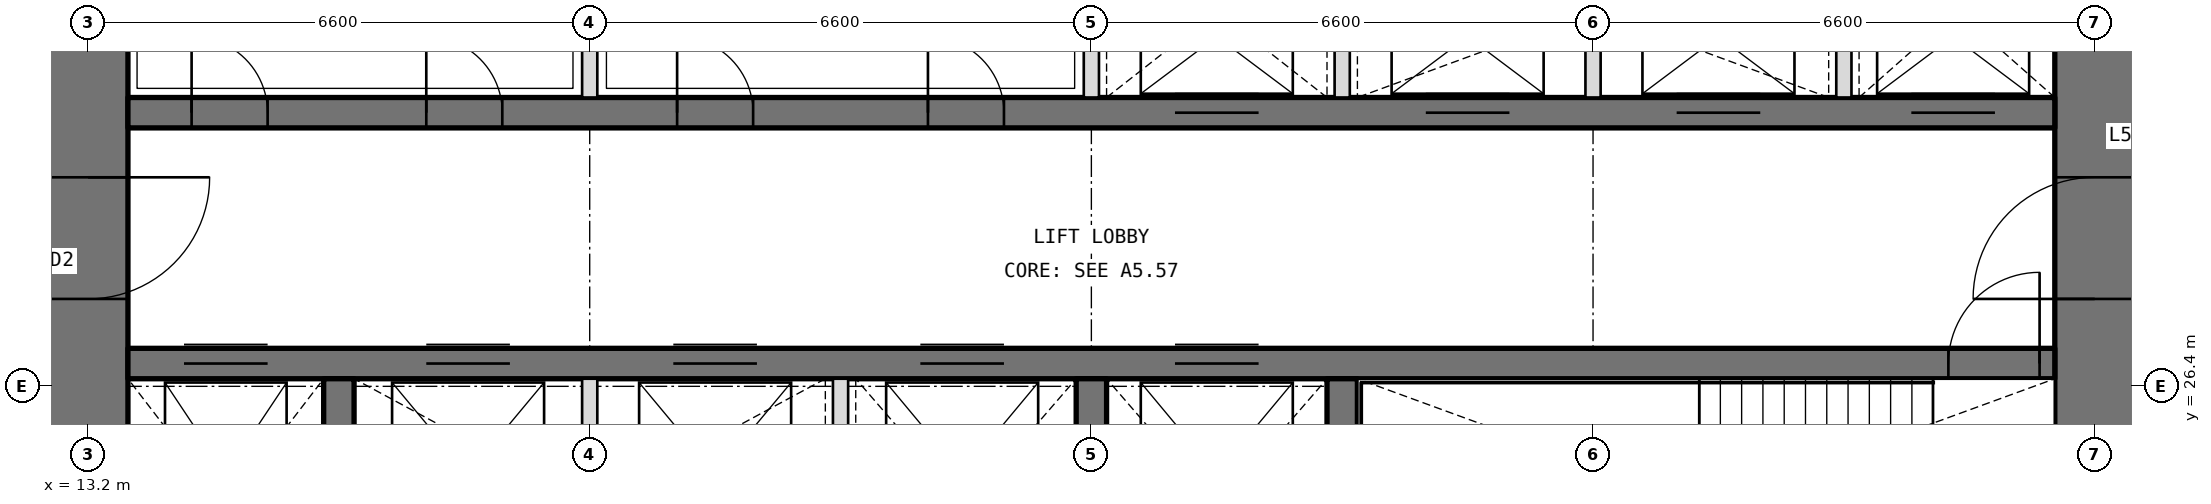
"""IFC4 building model, lengths in metres.
Left out: names, types, materials, properties, quantities, classifications, styles, units other than length and angle.
Written with IfcOpenShell. Run it as: python <this file> out.ifc"""

import sys

from ifc_helpers import new_model, si_unit, direction, frame, frame_2d, origin, place, context, subcontext, project, spatial, rectangle, extrude, element, fill, save


model = new_model("IFC4")
c1 = context("Model", 3, precision=1e-05, world=origin(), true_north=direction((0.0, 1.0)))
c2 = subcontext(c1, "Body", "Model", "MODEL_VIEW")
j1 = project(units=[si_unit("LENGTHUNIT", "METRE"), si_unit("PLANEANGLEUNIT", "RADIAN")], contexts=[c1])
p1 = place(None, origin())
s1 = spatial("IfcSite", under=j1, at=p1, CompositionType="ELEMENT")
p2 = place(p1, origin())
s2 = spatial("IfcBuilding", under=s1, at=p2, CompositionType="ELEMENT")
p3 = place(p2, frame((0.0, 0.0, 241.8)))
s3 = spatial("IfcBuildingStorey", under=s2, at=p3, CompositionType="ELEMENT", Elevation=241.8)
p4 = place(p3, frame((39.6, 13.725, 0.0), z_axis=(0.0, 0.0, 1.0), x_axis=(0.0, 1.0, 0.0)))
e1 = element("IfcWall", 1, at=p4, inside=s3, PredefinedType="SHEAR", context=c2, shape_type="SweptSolid", body=[
    extrude(rectangle(XDim=18.75, YDim=1.05, at=frame_2d((9.375, 0.0))), origin(), (0.0, 0.0, 1.0), 4.2),
])
p5 = place(p4, frame((3.025, 0.0, 0.0)))
e2 = element("IfcOpeningElement", 2, at=p5, cuts=e1, PredefinedType="OPENING", context=c2, shape_type="SweptSolid", body=[
    extrude(rectangle(XDim=1.6, YDim=2.1, at=frame_2d((0.8, 1.05))), frame((0.0, 0.535, 0.0), z_axis=(0.0, -1.0, 0.0), x_axis=(1.0, 0.0, 0.0)), (0.0, 0.0, 1.0), 1.07),
])
p6 = place(p4, frame((13.825, 0.0, 0.0)))
e3 = element("IfcOpeningElement", 3, at=p6, cuts=e1, PredefinedType="OPENING", context=c2, shape_type="SweptSolid", body=[
    extrude(rectangle(XDim=1.6, YDim=2.1, at=frame_2d((0.8, 1.05))), frame((0.0, 0.535, 0.0), z_axis=(0.0, -1.0, 0.0), x_axis=(1.0, 0.0, 0.0)), (0.0, 0.0, 1.0), 1.07),
])
p7 = place(p3, frame((13.2, 32.475, 0.0), z_axis=(0.0, 0.0, 1.0), x_axis=(0.0, -1.0, 0.0)))
e4 = element("IfcWall", 4, at=p7, inside=s3, PredefinedType="SHEAR", context=c2, shape_type="SweptSolid", body=[
    extrude(rectangle(XDim=18.75, YDim=1.05, at=frame_2d((9.375, 0.0))), origin(), (0.0, 0.0, 1.0), 4.2),
])
p8 = place(p7, frame((14.125, 0.0, 0.0)))
e5 = element("IfcOpeningElement", 5, at=p8, cuts=e4, PredefinedType="OPENING", context=c2, shape_type="SweptSolid", body=[
    extrude(rectangle(XDim=1.6, YDim=2.1, at=frame_2d((0.8, 1.05))), frame((0.0, 0.535, 0.0), z_axis=(0.0, -1.0, 0.0), x_axis=(1.0, 0.0, 0.0)), (0.0, 0.0, 1.0), 1.07),
])
p9 = place(p7, frame((3.325, 0.0, 0.0)))
e6 = element("IfcOpeningElement", 6, at=p9, cuts=e4, PredefinedType="OPENING", context=c2, shape_type="SweptSolid", body=[
    extrude(rectangle(XDim=1.6, YDim=2.1, at=frame_2d((0.8, 1.05))), frame((0.0, 0.535, 0.0), z_axis=(0.0, -1.0, 0.0), x_axis=(1.0, 0.0, 0.0)), (0.0, 0.0, 1.0), 1.07),
])
p10 = place(p3, frame((13.725, 26.7, 0.0), z_axis=(0.0, 0.0, 1.0), x_axis=(1.0, 0.0, 0.0)))
e7 = element("IfcWall", 7, at=p10, inside=s3, PredefinedType="SHEAR", context=c2, shape_type="SweptSolid", body=[
    extrude(rectangle(XDim=25.35, YDim=0.4, at=frame_2d((12.675, 0.0))), origin(), (0.0, 0.0, 1.0), 4.2),
])
p11 = place(p10, frame((23.95, 0.0, 0.0)))
e8 = element("IfcOpeningElement", 8, at=p11, cuts=e7, PredefinedType="OPENING", context=c2, shape_type="SweptSolid", body=[
    extrude(rectangle(XDim=1.2, YDim=2.1, at=frame_2d((0.6, 1.05))), frame((0.0, 0.21, 0.0), z_axis=(0.0, -1.0, 0.0), x_axis=(1.0, 0.0, 0.0)), (0.0, 0.0, 1.0), 0.42),
])
p12 = place(p10, frame((0.738, 0.0, 0.0)))
e9 = element("IfcOpeningElement", 9, at=p12, cuts=e7, PredefinedType="OPENING", context=c2, shape_type="SweptSolid", body=[
    extrude(rectangle(XDim=1.1, YDim=2.1, at=frame_2d((0.55, 1.05))), frame((0.0, 0.21, 0.0), z_axis=(0.0, -1.0, 0.0), x_axis=(1.0, 0.0, 0.0)), (0.0, 0.0, 1.0), 0.42),
])
p13 = place(p10, frame((3.925, 0.0, 0.0)))
e10 = element("IfcOpeningElement", 10, at=p13, cuts=e7, PredefinedType="OPENING", context=c2, shape_type="SweptSolid", body=[
    extrude(rectangle(XDim=1.1, YDim=2.1, at=frame_2d((0.55, 1.05))), frame((0.0, 0.21, 0.0), z_axis=(0.0, -1.0, 0.0), x_axis=(1.0, 0.0, 0.0)), (0.0, 0.0, 1.0), 0.42),
])
p14 = place(p10, frame((7.175, 0.0, 0.0)))
e11 = element("IfcOpeningElement", 11, at=p14, cuts=e7, PredefinedType="OPENING", context=c2, shape_type="SweptSolid", body=[
    extrude(rectangle(XDim=1.1, YDim=2.1, at=frame_2d((0.55, 1.05))), frame((0.0, 0.21, 0.0), z_axis=(0.0, -1.0, 0.0), x_axis=(1.0, 0.0, 0.0)), (0.0, 0.0, 1.0), 0.42),
])
p15 = place(p10, frame((10.425, 0.0, 0.0)))
e12 = element("IfcOpeningElement", 12, at=p15, cuts=e7, PredefinedType="OPENING", context=c2, shape_type="SweptSolid", body=[
    extrude(rectangle(XDim=1.1, YDim=2.1, at=frame_2d((0.55, 1.05))), frame((0.0, 0.21, 0.0), z_axis=(0.0, -1.0, 0.0), x_axis=(1.0, 0.0, 0.0)), (0.0, 0.0, 1.0), 0.42),
])
p16 = place(p10, frame((13.775, 0.0, 0.0)))
e13 = element("IfcOpeningElement", 13, at=p16, cuts=e7, PredefinedType="OPENING", context=c2, shape_type="SweptSolid", body=[
    extrude(rectangle(XDim=1.1, YDim=2.1, at=frame_2d((0.55, 1.05))), frame((0.0, 0.21, 0.0), z_axis=(0.0, -1.0, 0.0), x_axis=(1.0, 0.0, 0.0)), (0.0, 0.0, 1.0), 0.42),
])
p17 = place(p3, frame((13.725, 30.0, 0.0), z_axis=(0.0, 0.0, 1.0), x_axis=(1.0, 0.0, 0.0)))
e14 = element("IfcWall", 14, at=p17, inside=s3, PredefinedType="SHEAR", context=c2, shape_type="SweptSolid", body=[
    extrude(rectangle(XDim=25.35, YDim=0.4, at=frame_2d((12.675, 0.0))), origin(), (0.0, 0.0, 1.0), 4.2),
])
p18 = place(p17, frame((0.837, 0.0, 0.0)))
e15 = element("IfcOpeningElement", 15, at=p18, cuts=e14, PredefinedType="OPENING", context=c2, shape_type="SweptSolid", body=[
    extrude(rectangle(XDim=1.0, YDim=2.1, at=frame_2d((0.5, 1.05))), frame((0.0, 0.21, 0.0), z_axis=(0.0, -1.0, 0.0), x_axis=(1.0, 0.0, 0.0)), (0.0, 0.0, 1.0), 0.42),
])
p19 = place(p17, frame((3.925, 0.0, 0.0)))
e16 = element("IfcOpeningElement", 16, at=p19, cuts=e14, PredefinedType="OPENING", context=c2, shape_type="SweptSolid", body=[
    extrude(rectangle(XDim=1.0, YDim=2.1, at=frame_2d((0.5, 1.05))), frame((0.0, 0.21, 0.0), z_axis=(0.0, -1.0, 0.0), x_axis=(1.0, 0.0, 0.0)), (0.0, 0.0, 1.0), 0.42),
])
p20 = place(p17, frame((7.225, 0.0, 0.0)))
e17 = element("IfcOpeningElement", 17, at=p20, cuts=e14, PredefinedType="OPENING", context=c2, shape_type="SweptSolid", body=[
    extrude(rectangle(XDim=1.0, YDim=2.1, at=frame_2d((0.5, 1.05))), frame((0.0, 0.21, 0.0), z_axis=(0.0, -1.0, 0.0), x_axis=(1.0, 0.0, 0.0)), (0.0, 0.0, 1.0), 0.42),
])
p21 = place(p17, frame((10.525, 0.0, 0.0)))
e18 = element("IfcOpeningElement", 18, at=p21, cuts=e14, PredefinedType="OPENING", context=c2, shape_type="SweptSolid", body=[
    extrude(rectangle(XDim=1.0, YDim=2.1, at=frame_2d((0.5, 1.05))), frame((0.0, 0.21, 0.0), z_axis=(0.0, -1.0, 0.0), x_axis=(1.0, 0.0, 0.0)), (0.0, 0.0, 1.0), 0.42),
])
p22 = place(p17, frame((13.775, 0.0, 0.0)))
e19 = element("IfcOpeningElement", 19, at=p22, cuts=e14, PredefinedType="OPENING", context=c2, shape_type="SweptSolid", body=[
    extrude(rectangle(XDim=1.1, YDim=2.1, at=frame_2d((0.55, 1.05))), frame((0.0, 0.21, 0.0), z_axis=(0.0, -1.0, 0.0), x_axis=(1.0, 0.0, 0.0)), (0.0, 0.0, 1.0), 0.42),
])
p23 = place(p17, frame((17.075, 0.0, 0.0)))
e20 = element("IfcOpeningElement", 20, at=p23, cuts=e14, PredefinedType="OPENING", context=c2, shape_type="SweptSolid", body=[
    extrude(rectangle(XDim=1.1, YDim=2.1, at=frame_2d((0.55, 1.05))), frame((0.0, 0.21, 0.0), z_axis=(0.0, -1.0, 0.0), x_axis=(1.0, 0.0, 0.0)), (0.0, 0.0, 1.0), 0.42),
])
p24 = place(p17, frame((20.375, 0.0, 0.0)))
e21 = element("IfcOpeningElement", 21, at=p24, cuts=e14, PredefinedType="OPENING", context=c2, shape_type="SweptSolid", body=[
    extrude(rectangle(XDim=1.1, YDim=2.1, at=frame_2d((0.55, 1.05))), frame((0.0, 0.21, 0.0), z_axis=(0.0, -1.0, 0.0), x_axis=(1.0, 0.0, 0.0)), (0.0, 0.0, 1.0), 0.42),
])
p25 = place(p17, frame((23.462, 0.0, 0.0)))
e22 = element("IfcOpeningElement", 22, at=p25, cuts=e14, PredefinedType="OPENING", context=c2, shape_type="SweptSolid", body=[
    extrude(rectangle(XDim=1.1, YDim=2.1, at=frame_2d((0.55, 1.05))), frame((0.0, 0.21, 0.0), z_axis=(0.0, -1.0, 0.0), x_axis=(1.0, 0.0, 0.0)), (0.0, 0.0, 1.0), 0.42),
])
for number, where, z_axis, x_axis in (
    (23, (16.5, 23.15, 0.0), (0.0, 0.0, 1.0), (0.0, 1.0, 0.0)),
    (24, (26.4, 23.15, 0.0), (0.0, 0.0, 1.0), (0.0, 1.0, 0.0)),
    (25, (29.7, 23.15, 0.0), (0.0, 0.0, 1.0), (0.0, 1.0, 0.0)),
):
    element("IfcWall", number, at=place(p3, frame(where, z_axis=z_axis, x_axis=x_axis)), inside=s3, PredefinedType="SHEAR", context=c2, shape_type="SweptSolid", body=[
        extrude(rectangle(XDim=3.35, YDim=0.4, at=frame_2d((1.675, 0.0))), origin(), (0.0, 0.0, 1.0), 4.2),
    ])
for number, where, z_axis, x_axis in (
    (26, (19.8, 30.2, 0.0), (0.0, 0.0, 1.0), (0.0, 1.0, 0.0)),
    (27, (26.4, 30.2, 0.0), (0.0, 0.0, 1.0), (0.0, 1.0, 0.0)),
    (28, (29.7, 30.2, 0.0), (0.0, 0.0, 1.0), (0.0, 1.0, 0.0)),
    (29, (33.0, 30.2, 0.0), (0.0, 0.0, 1.0), (0.0, 1.0, 0.0)),
    (30, (36.3, 30.2, 0.0), (0.0, 0.0, 1.0), (0.0, 1.0, 0.0)),
):
    element("IfcWall", number, at=place(p3, frame(where, z_axis=z_axis, x_axis=x_axis)), inside=s3, PredefinedType="PARTITIONING", context=c2, shape_type="SweptSolid", body=[
        extrude(rectangle(XDim=2.275, YDim=0.2, at=frame_2d((1.138, 0.0))), origin(), (0.0, 0.0, 1.0), 4.2),
    ])
for number, where, z_axis, x_axis in (
    (31, (19.8, 23.15, 0.0), (0.0, 0.0, 1.0), (0.0, 1.0, 0.0)),
    (32, (23.1, 23.15, 0.0), (0.0, 0.0, 1.0), (0.0, 1.0, 0.0)),
):
    element("IfcWall", number, at=place(p3, frame(where, z_axis=z_axis, x_axis=x_axis)), inside=s3, PredefinedType="PARTITIONING", context=c2, shape_type="SweptSolid", body=[
        extrude(rectangle(XDim=3.35, YDim=0.2, at=frame_2d((1.675, 0.0))), origin(), (0.0, 0.0, 1.0), 4.2),
    ])
p26 = place(p18, origin())
e33 = element("IfcDoor", 33, at=p26, inside=s3, OperationType="SINGLE_SWING_LEFT", PredefinedType="DOOR", context=c2, shape_type="SweptSolid", body=[
    extrude(rectangle(XDim=1.0, YDim=2.1, at=frame_2d((0.5, 1.05))), frame((0.0, 0.025, 0.0), z_axis=(0.0, -1.0, 0.0), x_axis=(1.0, 0.0, 0.0)), (0.0, 0.0, 1.0), 0.05),
])
fill(e15, e33)
p27 = place(p19, origin())
e34 = element("IfcDoor", 34, at=p27, inside=s3, OperationType="SINGLE_SWING_LEFT", PredefinedType="DOOR", context=c2, shape_type="SweptSolid", body=[
    extrude(rectangle(XDim=1.0, YDim=2.1, at=frame_2d((0.5, 1.05))), frame((0.0, 0.025, 0.0), z_axis=(0.0, -1.0, 0.0), x_axis=(1.0, 0.0, 0.0)), (0.0, 0.0, 1.0), 0.05),
])
fill(e16, e34)
p28 = place(p20, origin())
e35 = element("IfcDoor", 35, at=p28, inside=s3, OperationType="SINGLE_SWING_LEFT", PredefinedType="DOOR", context=c2, shape_type="SweptSolid", body=[
    extrude(rectangle(XDim=1.0, YDim=2.1, at=frame_2d((0.5, 1.05))), frame((0.0, 0.025, 0.0), z_axis=(0.0, -1.0, 0.0), x_axis=(1.0, 0.0, 0.0)), (0.0, 0.0, 1.0), 0.05),
])
fill(e17, e35)
p29 = place(p21, origin())
e36 = element("IfcDoor", 36, at=p29, inside=s3, OperationType="SINGLE_SWING_LEFT", PredefinedType="DOOR", context=c2, shape_type="SweptSolid", body=[
    extrude(rectangle(XDim=1.0, YDim=2.1, at=frame_2d((0.5, 1.05))), frame((0.0, 0.025, 0.0), z_axis=(0.0, -1.0, 0.0), x_axis=(1.0, 0.0, 0.0)), (0.0, 0.0, 1.0), 0.05),
])
fill(e18, e36)
p30 = place(p11, origin())
e37 = element("IfcDoor", 37, at=p30, inside=s3, OperationType="SINGLE_SWING_RIGHT", PredefinedType="DOOR", context=c2, shape_type="SweptSolid", body=[
    extrude(rectangle(XDim=1.2, YDim=2.1, at=frame_2d((0.6, 1.05))), frame((0.0, 0.025, 0.0), z_axis=(0.0, -1.0, 0.0), x_axis=(1.0, 0.0, 0.0)), (0.0, 0.0, 1.0), 0.05),
])
fill(e8, e37)
p31 = place(p9, origin())
e38 = element("IfcDoor", 38, at=p31, inside=s3, OperationType="DOUBLE_DOOR_DOUBLE_SWING", PredefinedType="DOOR", context=c2, shape_type="SweptSolid", body=[
    extrude(rectangle(XDim=1.6, YDim=2.1, at=frame_2d((0.8, 1.05))), frame((0.0, 0.025, 0.0), z_axis=(0.0, -1.0, 0.0), x_axis=(1.0, 0.0, 0.0)), (0.0, 0.0, 1.0), 0.05),
])
fill(e6, e38)
p32 = place(p6, origin())
e39 = element("IfcDoor", 39, at=p32, inside=s3, OperationType="DOUBLE_DOOR_DOUBLE_SWING", PredefinedType="DOOR", context=c2, shape_type="SweptSolid", body=[
    extrude(rectangle(XDim=1.6, YDim=2.1, at=frame_2d((0.8, 1.05))), frame((0.0, 0.025, 0.0), z_axis=(0.0, -1.0, 0.0), x_axis=(1.0, 0.0, 0.0)), (0.0, 0.0, 1.0), 0.05),
])
fill(e3, e39)
p33 = place(p22, origin())
e40 = element("IfcDoor", 40, at=p33, inside=s3, OperationType="DOUBLE_DOOR_SLIDING", PredefinedType="DOOR", context=c2, shape_type="SweptSolid", body=[
    extrude(rectangle(XDim=1.1, YDim=2.1, at=frame_2d((0.55, 1.05))), frame((0.0, 0.025, 0.0), z_axis=(0.0, -1.0, 0.0), x_axis=(1.0, 0.0, 0.0)), (0.0, 0.0, 1.0), 0.05),
])
fill(e19, e40)
p34 = place(p23, origin())
e41 = element("IfcDoor", 41, at=p34, inside=s3, OperationType="DOUBLE_DOOR_SLIDING", PredefinedType="DOOR", context=c2, shape_type="SweptSolid", body=[
    extrude(rectangle(XDim=1.1, YDim=2.1, at=frame_2d((0.55, 1.05))), frame((0.0, 0.025, 0.0), z_axis=(0.0, -1.0, 0.0), x_axis=(1.0, 0.0, 0.0)), (0.0, 0.0, 1.0), 0.05),
])
fill(e20, e41)
p35 = place(p24, origin())
e42 = element("IfcDoor", 42, at=p35, inside=s3, OperationType="DOUBLE_DOOR_SLIDING", PredefinedType="DOOR", context=c2, shape_type="SweptSolid", body=[
    extrude(rectangle(XDim=1.1, YDim=2.1, at=frame_2d((0.55, 1.05))), frame((0.0, 0.025, 0.0), z_axis=(0.0, -1.0, 0.0), x_axis=(1.0, 0.0, 0.0)), (0.0, 0.0, 1.0), 0.05),
])
fill(e21, e42)
p36 = place(p25, origin())
e43 = element("IfcDoor", 43, at=p36, inside=s3, OperationType="DOUBLE_DOOR_SLIDING", PredefinedType="DOOR", context=c2, shape_type="SweptSolid", body=[
    extrude(rectangle(XDim=1.1, YDim=2.1, at=frame_2d((0.55, 1.05))), frame((0.0, 0.025, 0.0), z_axis=(0.0, -1.0, 0.0), x_axis=(1.0, 0.0, 0.0)), (0.0, 0.0, 1.0), 0.05),
])
fill(e22, e43)
p37 = place(p12, origin())
e44 = element("IfcDoor", 44, at=p37, inside=s3, OperationType="DOUBLE_DOOR_SLIDING", PredefinedType="DOOR", context=c2, shape_type="SweptSolid", body=[
    extrude(rectangle(XDim=1.1, YDim=2.1, at=frame_2d((0.55, 1.05))), frame((0.0, 0.025, 0.0), z_axis=(0.0, -1.0, 0.0), x_axis=(1.0, 0.0, 0.0)), (0.0, 0.0, 1.0), 0.05),
])
fill(e9, e44)
p38 = place(p13, origin())
e45 = element("IfcDoor", 45, at=p38, inside=s3, OperationType="DOUBLE_DOOR_SLIDING", PredefinedType="DOOR", context=c2, shape_type="SweptSolid", body=[
    extrude(rectangle(XDim=1.1, YDim=2.1, at=frame_2d((0.55, 1.05))), frame((0.0, 0.025, 0.0), z_axis=(0.0, -1.0, 0.0), x_axis=(1.0, 0.0, 0.0)), (0.0, 0.0, 1.0), 0.05),
])
fill(e10, e45)
p39 = place(p14, origin())
e46 = element("IfcDoor", 46, at=p39, inside=s3, OperationType="DOUBLE_DOOR_SLIDING", PredefinedType="DOOR", context=c2, shape_type="SweptSolid", body=[
    extrude(rectangle(XDim=1.1, YDim=2.1, at=frame_2d((0.55, 1.05))), frame((0.0, 0.025, 0.0), z_axis=(0.0, -1.0, 0.0), x_axis=(1.0, 0.0, 0.0)), (0.0, 0.0, 1.0), 0.05),
])
fill(e11, e46)
p40 = place(p15, origin())
e47 = element("IfcDoor", 47, at=p40, inside=s3, OperationType="DOUBLE_DOOR_SLIDING", PredefinedType="DOOR", context=c2, shape_type="SweptSolid", body=[
    extrude(rectangle(XDim=1.1, YDim=2.1, at=frame_2d((0.55, 1.05))), frame((0.0, 0.025, 0.0), z_axis=(0.0, -1.0, 0.0), x_axis=(1.0, 0.0, 0.0)), (0.0, 0.0, 1.0), 0.05),
])
fill(e12, e47)
p41 = place(p16, origin())
e48 = element("IfcDoor", 48, at=p41, inside=s3, OperationType="DOUBLE_DOOR_SLIDING", PredefinedType="DOOR", context=c2, shape_type="SweptSolid", body=[
    extrude(rectangle(XDim=1.1, YDim=2.1, at=frame_2d((0.55, 1.05))), frame((0.0, 0.025, 0.0), z_axis=(0.0, -1.0, 0.0), x_axis=(1.0, 0.0, 0.0)), (0.0, 0.0, 1.0), 0.05),
])
fill(e13, e48)
save(model, sys.argv[1])
